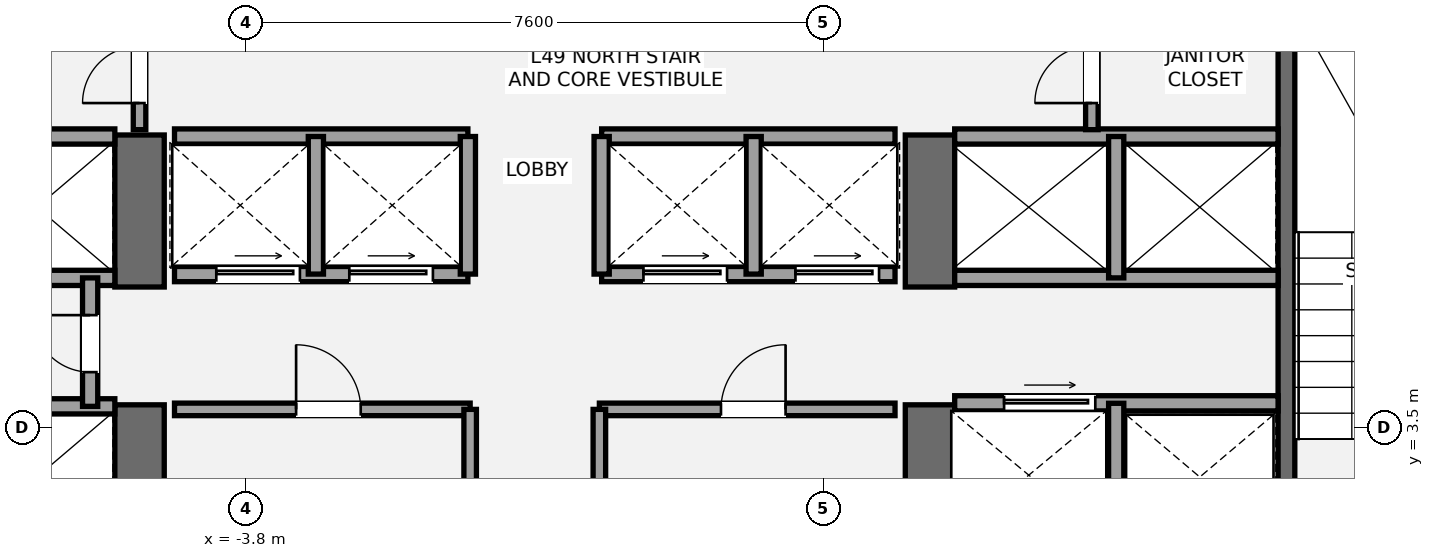
"""IFC4 building model, lengths in metres.
Left out: names, types, materials, properties, quantities, classifications, styles, units other than length and angle.
Written with IfcOpenShell. Run it as: python <this file> out.ifc"""

import sys

from ifc_helpers import new_model, si_unit, direction, frame, frame_2d, origin, place, context, subcontext, project, spatial, rectangle, extrude, element, fill, save


model = new_model("IFC4")
c1 = context("Model", 3, precision=1e-05, world=origin(), true_north=direction((0.0, 1.0)))
c2 = subcontext(c1, "Body", "Model", "MODEL_VIEW")
j1 = project(units=[si_unit("LENGTHUNIT", "METRE"), si_unit("PLANEANGLEUNIT", "RADIAN")], contexts=[c1])
p1 = place(None, origin())
s1 = spatial("IfcSite", under=j1, at=p1, CompositionType="ELEMENT")
p2 = place(p1, origin())
s2 = spatial("IfcBuilding", under=s1, at=p2, CompositionType="ELEMENT")
p3 = place(p2, frame((0.0, 0.0, 179.0)))
s3 = spatial("IfcBuildingStorey", under=s2, at=p3, CompositionType="ELEMENT", Elevation=179.0)
p4 = place(p3, frame((-5.2, 1.2, 0.0), z_axis=(0.0, 0.0, 1.0), x_axis=(0.0, 1.0, 0.0)))
e1 = element("IfcWall", 1, at=p4, inside=s3, PredefinedType="SHEAR", context=c2, shape_type="SweptSolid", body=[
    extrude(rectangle(XDim=2.6, YDim=0.65, at=frame_2d((1.3, 0.0))), origin(), (0.0, 0.0, 1.0), 3.2),
])
p5 = place(p3, frame((-5.2, 5.35, 0.0), z_axis=(0.0, 0.0, 1.0), x_axis=(0.0, 1.0, 0.0)))
e2 = element("IfcWall", 2, at=p5, inside=s3, PredefinedType="SHEAR", context=c2, shape_type="SweptSolid", body=[
    extrude(rectangle(XDim=2.0, YDim=0.65, at=frame_2d((1.0, 0.0))), origin(), (0.0, 0.0, 1.0), 3.2),
])
p6 = place(p3, frame((5.2, 1.2, 0.0), z_axis=(0.0, 0.0, 1.0), x_axis=(0.0, 1.0, 0.0)))
e3 = element("IfcWall", 3, at=p6, inside=s3, PredefinedType="SHEAR", context=c2, shape_type="SweptSolid", body=[
    extrude(rectangle(XDim=2.6, YDim=0.65, at=frame_2d((1.3, 0.0))), origin(), (0.0, 0.0, 1.0), 3.2),
])
p7 = place(p3, frame((5.2, 5.35, 0.0), z_axis=(0.0, 0.0, 1.0), x_axis=(0.0, 1.0, 0.0)))
e4 = element("IfcWall", 4, at=p7, inside=s3, PredefinedType="SHEAR", context=c2, shape_type="SweptSolid", body=[
    extrude(rectangle(XDim=2.0, YDim=0.65, at=frame_2d((1.0, 0.0))), origin(), (0.0, 0.0, 1.0), 3.2),
])
p8 = place(p3, frame((9.89, 1.85, 0.0), z_axis=(0.0, 0.0, 1.0), x_axis=(0.0, 1.0, 0.0)))
e5 = element("IfcWall", 5, at=p8, inside=s3, PredefinedType="SHEAR", context=c2, shape_type="SweptSolid", body=[
    extrude(rectangle(XDim=7.15, YDim=0.22, at=frame_2d((3.575, 0.0))), origin(), (0.0, 0.0, 1.0), 3.2),
])
for number, where, z_axis, x_axis in (
    (6, (-9.78, 3.78, 0.0), (0.0, 0.0, 1.0), (1.0, 0.0, 0.0)),
    (7, (-9.78, 5.47, 0.0), (0.0, 0.0, 1.0), (1.0, 0.0, 0.0)),
    (8, (-9.78, 7.33, 0.0), (0.0, 0.0, 1.0), (1.0, 0.0, 0.0)),
):
    element("IfcWall", number, at=place(p3, frame(where, z_axis=z_axis, x_axis=x_axis)), inside=s3, PredefinedType="SOLIDWALL", context=c2, shape_type="SweptSolid", body=[
        extrude(rectangle(XDim=4.255, YDim=0.2, at=frame_2d((2.127, 0.0))), origin(), (0.0, 0.0, 1.0), 3.02),
    ])
p9 = place(p3, frame((-5.85, 3.78, 0.0), z_axis=(0.0, 0.0, 1.0), x_axis=(0.0, 1.0, 0.0)))
e9 = element("IfcWall", 9, at=p9, inside=s3, PredefinedType="SOLIDWALL", context=c2, shape_type="SweptSolid", body=[
    extrude(rectangle(XDim=1.69, YDim=0.2, at=frame_2d((0.845, 0.0))), origin(), (0.0, 0.0, 1.0), 3.02),
])
p10 = place(p9, frame((0.45, 0.0, 0.0)))
e10 = element("IfcOpeningElement", 10, at=p10, cuts=e9, PredefinedType="OPENING", context=c2, shape_type="SweptSolid", body=[
    extrude(rectangle(XDim=0.75, YDim=2.1, at=frame_2d((0.375, 1.05))), frame((0.0, 0.11, 0.0), z_axis=(0.0, -1.0, 0.0), x_axis=(1.0, 0.0, 0.0)), (0.0, 0.0, 1.0), 0.22),
])
p11 = place(p3, frame((5.525, 3.82, 0.0), z_axis=(0.0, 0.0, 1.0), x_axis=(1.0, 0.0, 0.0)))
e11 = element("IfcWall", 11, at=p11, inside=s3, PredefinedType="SOLIDWALL", context=c2, shape_type="SweptSolid", body=[
    extrude(rectangle(XDim=4.255, YDim=0.2, at=frame_2d((2.127, 0.0))), origin(), (0.0, 0.0, 1.0), 3.02),
])
p12 = place(p11, frame((0.65, 0.0, 0.0)))
e12 = element("IfcOpeningElement", 12, at=p12, cuts=e11, PredefinedType="OPENING", context=c2, shape_type="SweptSolid", body=[
    extrude(rectangle(XDim=1.2, YDim=2.2, at=frame_2d((0.6, 1.1))), frame((0.0, 0.11, 0.0), z_axis=(0.0, -1.0, 0.0), x_axis=(1.0, 0.0, 0.0)), (0.0, 0.0, 1.0), 0.22),
])
p13 = place(p3, frame((7.65, 1.85, 0.0), z_axis=(0.0, 0.0, 1.0), x_axis=(0.0, 1.0, 0.0)))
e13 = element("IfcWall", 13, at=p13, inside=s3, PredefinedType="SOLIDWALL", context=c2, shape_type="SweptSolid", body=[
    extrude(rectangle(XDim=1.97, YDim=0.2, at=frame_2d((0.985, 0.0))), origin(), (0.0, 0.0, 1.0), 3.02),
])
for number, where, z_axis, x_axis in (
    (14, (5.525, 5.47, 0.0), (0.0, 0.0, 1.0), (1.0, 0.0, 0.0)),
    (15, (5.525, 7.33, 0.0), (0.0, 0.0, 1.0), (1.0, 0.0, 0.0)),
):
    element("IfcWall", number, at=place(p3, frame(where, z_axis=z_axis, x_axis=x_axis)), inside=s3, PredefinedType="SOLIDWALL", context=c2, shape_type="SweptSolid", body=[
        extrude(rectangle(XDim=4.255, YDim=0.2, at=frame_2d((2.127, 0.0))), origin(), (0.0, 0.0, 1.0), 3.02),
    ])
p14 = place(p3, frame((7.65, 5.47, 0.0), z_axis=(0.0, 0.0, 1.0), x_axis=(0.0, 1.0, 0.0)))
e16 = element("IfcWall", 16, at=p14, inside=s3, PredefinedType="SOLIDWALL", context=c2, shape_type="SweptSolid", body=[
    extrude(rectangle(XDim=1.86, YDim=0.2, at=frame_2d((0.93, 0.0))), origin(), (0.0, 0.0, 1.0), 3.02),
])
p15 = place(p3, frame((-4.74, 3.74, 0.0), z_axis=(0.0, 0.0, 1.0), x_axis=(1.0, 0.0, 0.0)))
e17 = element("IfcWall", 17, at=p15, inside=s3, PredefinedType="PARTITIONING", context=c2, shape_type="SweptSolid", body=[
    extrude(rectangle(XDim=3.89, YDim=0.165, at=frame_2d((1.945, 0.0))), origin(), (0.0, 0.0, 1.0), 3.02),
])
p16 = place(p15, frame((1.6, 0.0, 0.0)))
e18 = element("IfcOpeningElement", 18, at=p16, cuts=e17, PredefinedType="OPENING", context=c2, shape_type="SweptSolid", body=[
    extrude(rectangle(XDim=0.85, YDim=2.1, at=frame_2d((0.425, 1.05))), frame((0.0, 0.093, 0.0), z_axis=(0.0, -1.0, 0.0), x_axis=(1.0, 0.0, 0.0)), (0.0, 0.0, 1.0), 0.185),
])
p17 = place(p3, frame((-0.85, 1.92, 0.0), z_axis=(0.0, 0.0, 1.0), x_axis=(0.0, 1.0, 0.0)))
e19 = element("IfcWall", 19, at=p17, inside=s3, PredefinedType="PARTITIONING", context=c2, shape_type="SweptSolid", body=[
    extrude(rectangle(XDim=1.82, YDim=0.165, at=frame_2d((0.91, 0.0))), origin(), (0.0, 0.0, 1.0), 3.02),
])
p18 = place(p3, frame((0.85, 3.74, 0.0), z_axis=(0.0, 0.0, 1.0), x_axis=(1.0, 0.0, 0.0)))
e20 = element("IfcWall", 20, at=p18, inside=s3, PredefinedType="PARTITIONING", context=c2, shape_type="SweptSolid", body=[
    extrude(rectangle(XDim=3.89, YDim=0.165, at=frame_2d((1.945, 0.0))), origin(), (0.0, 0.0, 1.0), 3.02),
])
p19 = place(p18, frame((1.6, 0.0, 0.0)))
e21 = element("IfcOpeningElement", 21, at=p19, cuts=e20, PredefinedType="OPENING", context=c2, shape_type="SweptSolid", body=[
    extrude(rectangle(XDim=0.85, YDim=2.1, at=frame_2d((0.425, 1.05))), frame((0.0, 0.093, 0.0), z_axis=(0.0, -1.0, 0.0), x_axis=(1.0, 0.0, 0.0)), (0.0, 0.0, 1.0), 0.185),
])
p20 = place(p3, frame((0.85, 1.92, 0.0), z_axis=(0.0, 0.0, 1.0), x_axis=(0.0, 1.0, 0.0)))
e22 = element("IfcWall", 22, at=p20, inside=s3, PredefinedType="PARTITIONING", context=c2, shape_type="SweptSolid", body=[
    extrude(rectangle(XDim=1.82, YDim=0.165, at=frame_2d((0.91, 0.0))), origin(), (0.0, 0.0, 1.0), 3.02),
])
p21 = place(p3, frame((-4.74, 5.52, 0.0), z_axis=(0.0, 0.0, 1.0), x_axis=(1.0, 0.0, 0.0)))
e23 = element("IfcWall", 23, at=p21, inside=s3, PredefinedType="SOLIDWALL", context=c2, shape_type="SweptSolid", body=[
    extrude(rectangle(XDim=3.86, YDim=0.2, at=frame_2d((1.93, 0.0))), origin(), (0.0, 0.0, 1.0), 3.02),
])
p22 = place(p21, frame((0.55, 0.0, 0.0)))
e24 = element("IfcOpeningElement", 24, at=p22, cuts=e23, PredefinedType="OPENING", context=c2, shape_type="SweptSolid", body=[
    extrude(rectangle(XDim=1.1, YDim=2.2, at=frame_2d((0.55, 1.1))), frame((0.0, 0.11, 0.0), z_axis=(0.0, -1.0, 0.0), x_axis=(1.0, 0.0, 0.0)), (0.0, 0.0, 1.0), 0.22),
])
p23 = place(p21, frame((2.3, 0.0, 0.0)))
e25 = element("IfcOpeningElement", 25, at=p23, cuts=e23, PredefinedType="OPENING", context=c2, shape_type="SweptSolid", body=[
    extrude(rectangle(XDim=1.1, YDim=2.2, at=frame_2d((0.55, 1.1))), frame((0.0, 0.11, 0.0), z_axis=(0.0, -1.0, 0.0), x_axis=(1.0, 0.0, 0.0)), (0.0, 0.0, 1.0), 0.22),
])
p24 = place(p3, frame((0.88, 5.52, 0.0), z_axis=(0.0, 0.0, 1.0), x_axis=(1.0, 0.0, 0.0)))
e26 = element("IfcWall", 26, at=p24, inside=s3, PredefinedType="SOLIDWALL", context=c2, shape_type="SweptSolid", body=[
    extrude(rectangle(XDim=3.86, YDim=0.2, at=frame_2d((1.93, 0.0))), origin(), (0.0, 0.0, 1.0), 3.02),
])
p25 = place(p24, frame((0.55, 0.0, 0.0)))
e27 = element("IfcOpeningElement", 27, at=p25, cuts=e26, PredefinedType="OPENING", context=c2, shape_type="SweptSolid", body=[
    extrude(rectangle(XDim=1.1, YDim=2.2, at=frame_2d((0.55, 1.1))), frame((0.0, 0.11, 0.0), z_axis=(0.0, -1.0, 0.0), x_axis=(1.0, 0.0, 0.0)), (0.0, 0.0, 1.0), 0.22),
])
p26 = place(p24, frame((2.55, 0.0, 0.0)))
e28 = element("IfcOpeningElement", 28, at=p26, cuts=e26, PredefinedType="OPENING", context=c2, shape_type="SweptSolid", body=[
    extrude(rectangle(XDim=1.1, YDim=2.2, at=frame_2d((0.55, 1.1))), frame((0.0, 0.11, 0.0), z_axis=(0.0, -1.0, 0.0), x_axis=(1.0, 0.0, 0.0)), (0.0, 0.0, 1.0), 0.22),
])
for number, where, z_axis, x_axis in (
    (29, (-4.74, 7.33, 0.0), (0.0, 0.0, 1.0), (1.0, 0.0, 0.0)),
    (30, (0.88, 7.33, 0.0), (0.0, 0.0, 1.0), (1.0, 0.0, 0.0)),
):
    element("IfcWall", number, at=place(p3, frame(where, z_axis=z_axis, x_axis=x_axis)), inside=s3, PredefinedType="SOLIDWALL", context=c2, shape_type="SweptSolid", body=[
        extrude(rectangle(XDim=3.86, YDim=0.2, at=frame_2d((1.93, 0.0))), origin(), (0.0, 0.0, 1.0), 3.02),
    ])
for number, where, z_axis, x_axis in (
    (31, (-2.88, 5.52, 0.0), (0.0, 0.0, 1.0), (0.0, 1.0, 0.0)),
    (32, (2.88, 5.52, 0.0), (0.0, 0.0, 1.0), (0.0, 1.0, 0.0)),
    (33, (-0.88, 5.52, 0.0), (0.0, 0.0, 1.0), (0.0, 1.0, 0.0)),
    (34, (0.88, 5.52, 0.0), (0.0, 0.0, 1.0), (0.0, 1.0, 0.0)),
):
    element("IfcWall", number, at=place(p3, frame(where, z_axis=z_axis, x_axis=x_axis)), inside=s3, PredefinedType="SOLIDWALL", context=c2, shape_type="SweptSolid", body=[
        extrude(rectangle(XDim=1.81, YDim=0.2, at=frame_2d((0.905, 0.0))), origin(), (0.0, 0.0, 1.0), 3.02),
    ])
p27 = place(p3, frame((-5.2, 7.42, 0.0), z_axis=(0.0, 0.0, 1.0), x_axis=(0.0, 1.0, 0.0)))
e35 = element("IfcWall", 35, at=p27, inside=s3, PredefinedType="PARTITIONING", context=c2, shape_type="SweptSolid", body=[
    extrude(rectangle(XDim=1.58, YDim=0.165, at=frame_2d((0.79, 0.0))), origin(), (0.0, 0.0, 1.0), 3.02),
])
p28 = place(p27, frame((0.35, 0.0, 0.0)))
e36 = element("IfcOpeningElement", 36, at=p28, cuts=e35, PredefinedType="OPENING", context=c2, shape_type="SweptSolid", body=[
    extrude(rectangle(XDim=0.75, YDim=2.1, at=frame_2d((0.375, 1.05))), frame((0.0, 0.093, 0.0), z_axis=(0.0, -1.0, 0.0), x_axis=(1.0, 0.0, 0.0)), (0.0, 0.0, 1.0), 0.185),
])
p29 = place(p3, frame((7.33, 7.42, 0.0), z_axis=(0.0, 0.0, 1.0), x_axis=(0.0, 1.0, 0.0)))
e37 = element("IfcWall", 37, at=p29, inside=s3, PredefinedType="PARTITIONING", context=c2, shape_type="SweptSolid", body=[
    extrude(rectangle(XDim=1.58, YDim=0.165, at=frame_2d((0.79, 0.0))), origin(), (0.0, 0.0, 1.0), 3.02),
])
p30 = place(p29, frame((0.35, 0.0, 0.0)))
e38 = element("IfcOpeningElement", 38, at=p30, cuts=e37, PredefinedType="OPENING", context=c2, shape_type="SweptSolid", body=[
    extrude(rectangle(XDim=0.75, YDim=2.1, at=frame_2d((0.375, 1.05))), frame((0.0, 0.093, 0.0), z_axis=(0.0, -1.0, 0.0), x_axis=(1.0, 0.0, 0.0)), (0.0, 0.0, 1.0), 0.185),
])
p31 = place(p10, origin())
e39 = element("IfcDoor", 39, at=p31, inside=s3, OperationType="SINGLE_SWING_RIGHT", PredefinedType="DOOR", context=c2, shape_type="SweptSolid", body=[
    extrude(rectangle(XDim=0.75, YDim=2.1, at=frame_2d((0.375, 1.05))), frame((0.0, 0.025, 0.0), z_axis=(0.0, -1.0, 0.0), x_axis=(1.0, 0.0, 0.0)), (0.0, 0.0, 1.0), 0.05),
])
fill(e10, e39)
p32 = place(p12, origin())
e40 = element("IfcDoor", 40, at=p32, inside=s3, OperationType="SLIDING_TO_RIGHT", PredefinedType="DOOR", context=c2, shape_type="SweptSolid", body=[
    extrude(rectangle(XDim=1.2, YDim=2.2, at=frame_2d((0.6, 1.1))), frame((0.0, 0.025, 0.0), z_axis=(0.0, -1.0, 0.0), x_axis=(1.0, 0.0, 0.0)), (0.0, 0.0, 1.0), 0.05),
])
fill(e12, e40)
p33 = place(p16, origin())
e41 = element("IfcDoor", 41, at=p33, inside=s3, OperationType="SINGLE_SWING_LEFT", PredefinedType="DOOR", context=c2, shape_type="SweptSolid", body=[
    extrude(rectangle(XDim=0.85, YDim=2.1, at=frame_2d((0.425, 1.05))), frame((0.0, 0.025, 0.0), z_axis=(0.0, -1.0, 0.0), x_axis=(1.0, 0.0, 0.0)), (0.0, 0.0, 1.0), 0.05),
])
fill(e18, e41)
p34 = place(p19, origin())
e42 = element("IfcDoor", 42, at=p34, inside=s3, OperationType="SINGLE_SWING_RIGHT", PredefinedType="DOOR", context=c2, shape_type="SweptSolid", body=[
    extrude(rectangle(XDim=0.85, YDim=2.1, at=frame_2d((0.425, 1.05))), frame((0.0, 0.025, 0.0), z_axis=(0.0, -1.0, 0.0), x_axis=(1.0, 0.0, 0.0)), (0.0, 0.0, 1.0), 0.05),
])
fill(e21, e42)
p35 = place(p22, origin())
e43 = element("IfcDoor", 43, at=p35, inside=s3, OperationType="SLIDING_TO_LEFT", PredefinedType="DOOR", context=c2, shape_type="SweptSolid", body=[
    extrude(rectangle(XDim=1.1, YDim=2.2, at=frame_2d((0.55, 1.1))), frame((0.0, 0.025, 0.0), z_axis=(0.0, -1.0, 0.0), x_axis=(1.0, 0.0, 0.0)), (0.0, 0.0, 1.0), 0.05),
])
fill(e24, e43)
p36 = place(p23, origin())
e44 = element("IfcDoor", 44, at=p36, inside=s3, OperationType="SLIDING_TO_LEFT", PredefinedType="DOOR", context=c2, shape_type="SweptSolid", body=[
    extrude(rectangle(XDim=1.1, YDim=2.2, at=frame_2d((0.55, 1.1))), frame((0.0, 0.025, 0.0), z_axis=(0.0, -1.0, 0.0), x_axis=(1.0, 0.0, 0.0)), (0.0, 0.0, 1.0), 0.05),
])
fill(e25, e44)
p37 = place(p25, origin())
e45 = element("IfcDoor", 45, at=p37, inside=s3, OperationType="SLIDING_TO_LEFT", PredefinedType="DOOR", context=c2, shape_type="SweptSolid", body=[
    extrude(rectangle(XDim=1.1, YDim=2.2, at=frame_2d((0.55, 1.1))), frame((0.0, 0.025, 0.0), z_axis=(0.0, -1.0, 0.0), x_axis=(1.0, 0.0, 0.0)), (0.0, 0.0, 1.0), 0.05),
])
fill(e27, e45)
p38 = place(p26, origin())
e46 = element("IfcDoor", 46, at=p38, inside=s3, OperationType="SLIDING_TO_LEFT", PredefinedType="DOOR", context=c2, shape_type="SweptSolid", body=[
    extrude(rectangle(XDim=1.1, YDim=2.2, at=frame_2d((0.55, 1.1))), frame((0.0, 0.025, 0.0), z_axis=(0.0, -1.0, 0.0), x_axis=(1.0, 0.0, 0.0)), (0.0, 0.0, 1.0), 0.05),
])
fill(e28, e46)
p39 = place(p28, origin())
e47 = element("IfcDoor", 47, at=p39, inside=s3, OperationType="SINGLE_SWING_LEFT", PredefinedType="DOOR", context=c2, shape_type="SweptSolid", body=[
    extrude(rectangle(XDim=0.75, YDim=2.1, at=frame_2d((0.375, 1.05))), frame((0.0, 0.025, 0.0), z_axis=(0.0, -1.0, 0.0), x_axis=(1.0, 0.0, 0.0)), (0.0, 0.0, 1.0), 0.05),
])
fill(e36, e47)
p40 = place(p30, origin())
e48 = element("IfcDoor", 48, at=p40, inside=s3, OperationType="SINGLE_SWING_LEFT", PredefinedType="DOOR", context=c2, shape_type="SweptSolid", body=[
    extrude(rectangle(XDim=0.75, YDim=2.1, at=frame_2d((0.375, 1.05))), frame((0.0, 0.025, 0.0), z_axis=(0.0, -1.0, 0.0), x_axis=(1.0, 0.0, 0.0)), (0.0, 0.0, 1.0), 0.05),
])
fill(e38, e48)
save(model, sys.argv[1])
